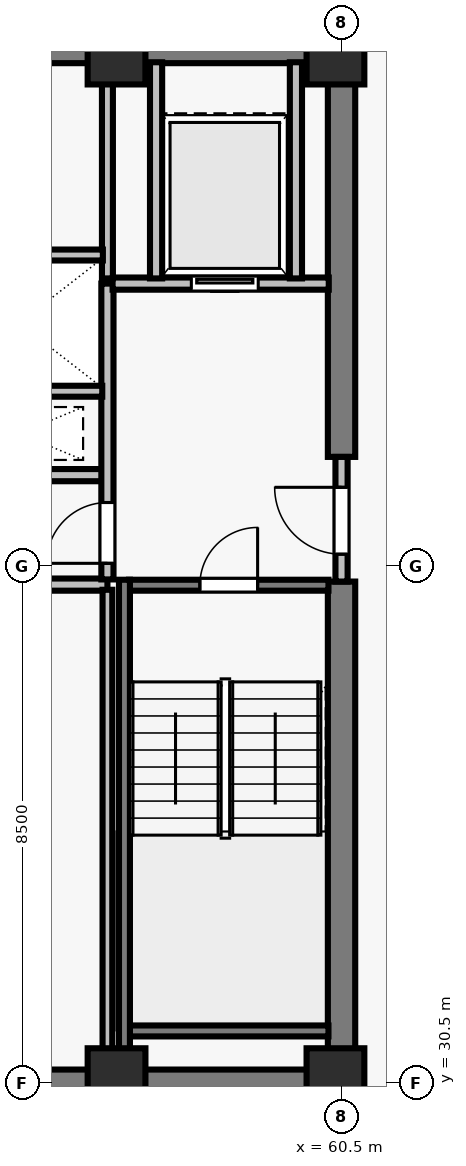
"""IFC4 building model, lengths in metres.
Left out: names, types, materials, properties, quantities, classifications, styles, units other than length and angle.
Written with IfcOpenShell. Run it as: python <this file> out.ifc"""

import sys

from ifc_helpers import new_model, si_unit, direction, frame, frame_2d, origin, origin_2d, place, context, subcontext, project, spatial, rectangle, extrude, element, fill, save


model = new_model("IFC4")
c1 = context("Model", 3, precision=1e-05, world=origin(), true_north=direction((0.0, 1.0)))
c2 = subcontext(c1, "Body", "Model", "MODEL_VIEW")
j1 = project(units=[si_unit("LENGTHUNIT", "METRE"), si_unit("PLANEANGLEUNIT", "RADIAN")], contexts=[c1])
p1 = place(None, origin())
s1 = spatial("IfcSite", under=j1, at=p1, CompositionType="ELEMENT")
p2 = place(p1, origin())
s2 = spatial("IfcBuilding", under=s1, at=p2, CompositionType="ELEMENT")
p3 = place(p2, frame((0.0, 0.0, 269.0)))
s3 = spatial("IfcBuildingStorey", under=s2, at=p3, CompositionType="ELEMENT", Elevation=269.0)
for number, where, z_axis, x_axis in (
    (1, (56.8, 30.6, 0.0), (0.0, 0.0, 1.0), (1.0, 0.0, 0.0)),
    (2, (60.4, 30.6, 0.0), (0.0, 0.0, 1.0), (1.0, 0.0, 0.0)),
    (3, (56.8, 47.4, 0.0), (0.0, 0.0, 1.0), (1.0, 0.0, 0.0)),
    (4, (60.4, 47.4, 0.0), (0.0, 0.0, 1.0), (1.0, 0.0, 0.0)),
):
    element("IfcColumn", number, at=place(p3, frame(where, z_axis=z_axis, x_axis=x_axis)), inside=s3, PredefinedType="COLUMN", context=c2, shape_type="SweptSolid", body=[
        extrude(rectangle(XDim=0.95, YDim=0.95, at=origin_2d()), origin(), (0.0, 0.0, 1.0), 3.5),
    ])
for number, where, z_axis, x_axis in (
    (5, (43.275, 30.5, 0.0), (0.0, 0.0, 1.0), (1.0, 0.0, 0.0)),
    (6, (43.275, 47.5, 0.0), (0.0, 0.0, 1.0), (1.0, 0.0, 0.0)),
):
    element("IfcWall", number, at=place(p3, frame(where, z_axis=z_axis, x_axis=x_axis)), inside=s3, PredefinedType="SHEAR", context=c2, shape_type="SweptSolid", body=[
        extrude(rectangle(XDim=17.45, YDim=0.45, at=frame_2d((8.725, 0.0))), origin(), (0.0, 0.0, 1.0), 3.29),
    ])
p4 = place(p3, frame((60.5, 30.715, 0.0), z_axis=(0.0, 0.0, 1.0), x_axis=(0.0, 1.0, 0.0)))
e7 = element("IfcWall", 7, at=p4, inside=s3, PredefinedType="SHEAR", context=c2, shape_type="SweptSolid", body=[
    extrude(rectangle(XDim=8.035, YDim=0.45, at=frame_2d((4.018, 0.0))), origin(), (0.0, 0.0, 1.0), 3.29),
])
p5 = place(p3, frame((60.5, 40.8, 0.0), z_axis=(0.0, 0.0, 1.0), x_axis=(0.0, 1.0, 0.0)))
e8 = element("IfcWall", 8, at=p5, inside=s3, PredefinedType="SHEAR", context=c2, shape_type="SweptSolid", body=[
    extrude(rectangle(XDim=6.485, YDim=0.45, at=frame_2d((3.242, 0.0))), origin(), (0.0, 0.0, 1.0), 3.29),
])
for number, where, z_axis, x_axis in (
    (9, (53.7, 38.7, 0.0), (0.0, 0.0, 1.0), (1.0, 0.0, 0.0)),
    (10, (53.7, 40.5, 0.0), (0.0, 0.0, 1.0), (1.0, 0.0, 0.0)),
):
    element("IfcWall", number, at=place(p3, frame(where, z_axis=z_axis, x_axis=x_axis)), inside=s3, PredefinedType="SOLIDWALL", context=c2, shape_type="SweptSolid", body=[
        extrude(rectangle(XDim=2.95, YDim=0.2, at=frame_2d((1.475, 0.0))), origin(), (0.0, 0.0, 1.0), 3.29),
    ])
p6 = place(p3, frame((60.5, 38.75, 0.0), z_axis=(0.0, 0.0, 1.0), x_axis=(0.0, 1.0, 0.0)))
e11 = element("IfcWall", 11, at=p6, inside=s3, PredefinedType="SOLIDWALL", context=c2, shape_type="SweptSolid", body=[
    extrude(rectangle(XDim=2.05, YDim=0.2, at=frame_2d((1.025, 0.0))), origin(), (0.0, 0.0, 1.0), 3.29),
])
p7 = place(p6, frame((0.45, 0.0, 0.0)))
e12 = element("IfcOpeningElement", 12, at=p7, cuts=e11, PredefinedType="OPENING", context=c2, shape_type="SweptSolid", body=[
    extrude(rectangle(XDim=1.1, YDim=2.15, at=frame_2d((0.55, 1.075))), frame((0.0, 0.11, 0.0), z_axis=(0.0, -1.0, 0.0), x_axis=(1.0, 0.0, 0.0)), (0.0, 0.0, 1.0), 0.22),
])
p8 = place(p3, frame((56.65, 38.785, 0.0), z_axis=(0.0, 0.0, 1.0), x_axis=(0.0, 1.0, 0.0)))
e13 = element("IfcWall", 13, at=p8, inside=s3, PredefinedType="SOLIDWALL", context=c2, shape_type="SweptSolid", body=[
    extrude(rectangle(XDim=4.865, YDim=0.2, at=frame_2d((2.433, 0.0))), origin(), (0.0, 0.0, 1.0), 3.29),
])
p9 = place(p8, frame((0.265, 0.0, 0.0)))
e14 = element("IfcOpeningElement", 14, at=p9, cuts=e13, PredefinedType="OPENING", context=c2, shape_type="SweptSolid", body=[
    extrude(rectangle(XDim=1.0, YDim=2.15, at=frame_2d((0.5, 1.075))), frame((0.0, 0.11, 0.0), z_axis=(0.0, -1.0, 0.0), x_axis=(1.0, 0.0, 0.0)), (0.0, 0.0, 1.0), 0.22),
])
p10 = place(p3, frame((56.735, 43.65, 0.0), z_axis=(0.0, 0.0, 1.0), x_axis=(1.0, 0.0, 0.0)))
e15 = element("IfcWall", 15, at=p10, inside=s3, PredefinedType="SOLIDWALL", context=c2, shape_type="SweptSolid", body=[
    extrude(rectangle(XDim=3.555, YDim=0.2, at=frame_2d((1.777, 0.0))), origin(), (0.0, 0.0, 1.0), 3.29),
])
p11 = place(p10, frame((1.295, 0.0, 0.0)))
e16 = element("IfcOpeningElement", 16, at=p11, cuts=e15, PredefinedType="OPENING", context=c2, shape_type="SweptSolid", body=[
    extrude(rectangle(XDim=1.1, YDim=2.2, at=frame_2d((0.55, 1.1))), frame((0.0, 0.11, 0.0), z_axis=(0.0, -1.0, 0.0), x_axis=(1.0, 0.0, 0.0)), (0.0, 0.0, 1.0), 0.22),
])
for number, where, z_axis, x_axis in (
    (17, (57.45, 43.735, 0.0), (0.0, 0.0, 1.0), (0.0, 1.0, 0.0)),
    (18, (59.75, 43.735, 0.0), (0.0, 0.0, 1.0), (0.0, 1.0, 0.0)),
):
    element("IfcWall", number, at=place(p3, frame(where, z_axis=z_axis, x_axis=x_axis)), inside=s3, PredefinedType="SOLIDWALL", context=c2, shape_type="SweptSolid", body=[
        extrude(rectangle(XDim=3.555, YDim=0.2, at=frame_2d((1.777, 0.0))), origin(), (0.0, 0.0, 1.0), 3.29),
    ])
p12 = place(p3, frame((56.65, 30.71, 0.0), z_axis=(0.0, 0.0, 1.0), x_axis=(0.0, 1.0, 0.0)))
e19 = element("IfcWall", 19, at=p12, inside=s3, PredefinedType="PARTITIONING", context=c2, shape_type="SweptSolid", body=[
    extrude(rectangle(XDim=7.905, YDim=0.16, at=frame_2d((3.953, 0.0))), origin(), (0.0, 0.0, 1.0), 3.29),
])
p13 = place(p3, frame((56.65, 43.735, 0.0), z_axis=(0.0, 0.0, 1.0), x_axis=(0.0, 1.0, 0.0)))
e20 = element("IfcWall", 20, at=p13, inside=s3, PredefinedType="SOLIDWALL", context=c2, shape_type="SweptSolid", body=[
    extrude(rectangle(XDim=3.555, YDim=0.18, at=frame_2d((1.777, 0.0))), origin(), (0.0, 0.0, 1.0), 3.29),
])
p14 = place(p3, frame((53.785, 41.88, 0.0), z_axis=(0.0, 0.0, 1.0), x_axis=(1.0, 0.0, 0.0)))
e21 = element("IfcWall", 21, at=p14, inside=s3, PredefinedType="SOLIDWALL", context=c2, shape_type="SweptSolid", body=[
    extrude(rectangle(XDim=2.78, YDim=0.18, at=frame_2d((1.39, 0.0))), origin(), (0.0, 0.0, 1.0), 3.29),
])
p15 = place(p3, frame((53.785, 44.12, 0.0), z_axis=(0.0, 0.0, 1.0), x_axis=(1.0, 0.0, 0.0)))
e22 = element("IfcWall", 22, at=p15, inside=s3, PredefinedType="SOLIDWALL", context=c2, shape_type="SweptSolid", body=[
    extrude(rectangle(XDim=2.79, YDim=0.18, at=frame_2d((1.395, 0.0))), origin(), (0.0, 0.0, 1.0), 3.29),
])
p16 = place(p3, frame((57.005, 38.69, 0.0), z_axis=(0.0, 0.0, 1.0), x_axis=(1.0, 0.0, 0.0)))
e23 = element("IfcWall", 23, at=p16, inside=s3, PredefinedType="SOLIDWALL", context=c2, shape_type="SweptSolid", body=[
    extrude(rectangle(XDim=3.28, YDim=0.18, at=frame_2d((1.64, 0.0))), origin(), (0.0, 0.0, 1.0), 3.29),
])
p17 = place(p16, frame((1.165, 0.0, 0.0)))
e24 = element("IfcOpeningElement", 24, at=p17, cuts=e23, PredefinedType="OPENING", context=c2, shape_type="SweptSolid", body=[
    extrude(rectangle(XDim=0.95, YDim=2.15, at=frame_2d((0.475, 1.075))), frame((0.0, 0.1, 0.0), z_axis=(0.0, -1.0, 0.0), x_axis=(1.0, 0.0, 0.0)), (0.0, 0.0, 1.0), 0.2),
])
p18 = place(p3, frame((57.005, 31.36, 0.0), z_axis=(0.0, 0.0, 1.0), x_axis=(1.0, 0.0, 0.0)))
e25 = element("IfcWall", 25, at=p18, inside=s3, PredefinedType="SOLIDWALL", context=c2, shape_type="SweptSolid", body=[
    extrude(rectangle(XDim=3.28, YDim=0.18, at=frame_2d((1.64, 0.0))), origin(), (0.0, 0.0, 1.0), 3.29),
])
p19 = place(p3, frame((56.93, 38.78, 0.0), z_axis=(0.0, 0.0, 1.0), x_axis=(0.0, -1.0, 0.0)))
e26 = element("IfcWall", 26, at=p19, inside=s3, PredefinedType="SOLIDWALL", context=c2, shape_type="SweptSolid", body=[
    extrude(rectangle(XDim=8.067, YDim=0.18, at=frame_2d((4.034, 0.0))), origin(), (0.0, 0.0, 1.0), 3.29),
])
p20 = place(p7, origin())
e27 = element("IfcDoor", 27, at=p20, inside=s3, OperationType="SINGLE_SWING_RIGHT", PredefinedType="DOOR", context=c2, shape_type="SweptSolid", body=[
    extrude(rectangle(XDim=1.1, YDim=2.15, at=frame_2d((0.55, 1.075))), frame((0.0, 0.025, 0.0), z_axis=(0.0, -1.0, 0.0), x_axis=(1.0, 0.0, 0.0)), (0.0, 0.0, 1.0), 0.05),
])
fill(e12, e27)
p21 = place(p9, origin())
e28 = element("IfcDoor", 28, at=p21, inside=s3, OperationType="SINGLE_SWING_LEFT", PredefinedType="DOOR", context=c2, shape_type="SweptSolid", body=[
    extrude(rectangle(XDim=1.0, YDim=2.15, at=frame_2d((0.5, 1.075))), frame((0.0, 0.025, 0.0), z_axis=(0.0, -1.0, 0.0), x_axis=(1.0, 0.0, 0.0)), (0.0, 0.0, 1.0), 0.05),
])
fill(e14, e28)
p22 = place(p11, origin())
e29 = element("IfcDoor", 29, at=p22, inside=s3, OperationType="SLIDING_TO_LEFT", PredefinedType="DOOR", context=c2, shape_type="SweptSolid", body=[
    extrude(rectangle(XDim=1.1, YDim=2.2, at=frame_2d((0.55, 1.1))), frame((0.0, 0.025, 0.0), z_axis=(0.0, -1.0, 0.0), x_axis=(1.0, 0.0, 0.0)), (0.0, 0.0, 1.0), 0.05),
])
fill(e16, e29)
p23 = place(p17, origin())
e30 = element("IfcDoor", 30, at=p23, inside=s3, OperationType="SINGLE_SWING_RIGHT", PredefinedType="DOOR", context=c2, shape_type="SweptSolid", body=[
    extrude(rectangle(XDim=0.95, YDim=2.15, at=frame_2d((0.475, 1.075))), frame((0.0, 0.025, 0.0), z_axis=(0.0, -1.0, 0.0), x_axis=(1.0, 0.0, 0.0)), (0.0, 0.0, 1.0), 0.05),
])
fill(e24, e30)
save(model, sys.argv[1])
